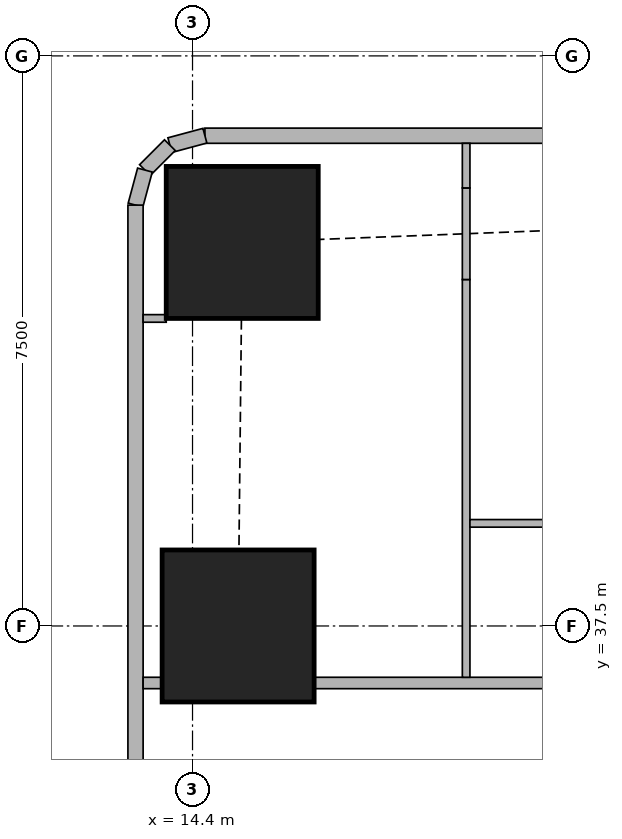
"""IFC4 building model, lengths in metres.
Left out: names, types, materials, properties, quantities, classifications, styles, units other than length and angle.
Written with IfcOpenShell. Run it as: python <this file> out.ifc"""

import sys

from ifc_helpers import new_model, si_unit, direction, frame, frame_2d, origin, origin_2d, place, context, subcontext, project, spatial, rectangle, extrude, element, fill, save


model = new_model("IFC4")
c1 = context("Model", 3, precision=1e-05, world=origin(), true_north=direction((0.0, 1.0)))
c2 = subcontext(c1, "Body", "Model", "MODEL_VIEW")
j1 = project(units=[si_unit("LENGTHUNIT", "METRE"), si_unit("PLANEANGLEUNIT", "RADIAN")], contexts=[c1])
p1 = place(None, origin())
s1 = spatial("IfcSite", under=j1, at=p1, CompositionType="ELEMENT")
p2 = place(p1, origin())
s2 = spatial("IfcBuilding", under=s1, at=p2, CompositionType="ELEMENT")
p3 = place(p2, frame((0.0, 0.0, 285.35)))
s3 = spatial("IfcBuildingStorey", under=s2, at=p3, CompositionType="ELEMENT", Elevation=285.35)
for number, where, z_axis, x_axis in (
    (1, (15.0, 37.5, 0.0), (0.0, 0.0, 1.0), (1.0, 0.0, 0.0)),
    (2, (15.054, 42.546, 0.0), (0.0, 0.0, 1.0), (1.0, 0.0, 0.0)),
):
    element("IfcColumn", number, at=place(p3, frame(where, z_axis=z_axis, x_axis=x_axis)), inside=s3, PredefinedType="COLUMN", context=c2, shape_type="SweptSolid", body=[
        extrude(rectangle(XDim=2.0, YDim=2.0, at=origin_2d()), origin(), (0.0, 0.0, 1.0), 3.75),
    ])
p4 = place(p3, frame((42.103, 43.95, 0.0), z_axis=(0.0, 0.0, 1.0), x_axis=(-1.0, 0.0, 0.0)))
e3 = element("IfcWall", 3, at=p4, inside=s3, PredefinedType="SOLIDWALL", context=c2, shape_type="SweptSolid", body=[
    extrude(rectangle(XDim=27.54, YDim=0.2, at=frame_2d((13.77, 0.0))), origin(), (0.0, 0.0, 1.0), 3.5),
])
p5 = place(p4, frame((10.603, 0.0, 0.9)))
e4 = element("IfcOpeningElement", 4, at=p5, cuts=e3, PredefinedType="OPENING", context=c2, shape_type="SweptSolid", body=[
    extrude(rectangle(XDim=1.8, YDim=1.5, at=frame_2d((0.9, 0.75))), frame((0.0, 0.11, 0.0), z_axis=(0.0, -1.0, 0.0), x_axis=(1.0, 0.0, 0.0)), (0.0, 0.0, 1.0), 0.22),
])
p6 = place(p4, frame((14.203, 0.0, 0.9)))
e5 = element("IfcOpeningElement", 5, at=p6, cuts=e3, PredefinedType="OPENING", context=c2, shape_type="SweptSolid", body=[
    extrude(rectangle(XDim=1.8, YDim=1.5, at=frame_2d((0.9, 0.75))), frame((0.0, 0.11, 0.0), z_axis=(0.0, -1.0, 0.0), x_axis=(1.0, 0.0, 0.0)), (0.0, 0.0, 1.0), 0.22),
])
p7 = place(p4, frame((17.803, 0.0, 0.9)))
e6 = element("IfcOpeningElement", 6, at=p7, cuts=e3, PredefinedType="OPENING", context=c2, shape_type="SweptSolid", body=[
    extrude(rectangle(XDim=1.8, YDim=1.5, at=frame_2d((0.9, 0.75))), frame((0.0, 0.11, 0.0), z_axis=(0.0, -1.0, 0.0), x_axis=(1.0, 0.0, 0.0)), (0.0, 0.0, 1.0), 0.22),
])
p8 = place(p4, frame((21.403, 0.0, 0.9)))
e7 = element("IfcOpeningElement", 7, at=p8, cuts=e3, PredefinedType="OPENING", context=c2, shape_type="SweptSolid", body=[
    extrude(rectangle(XDim=1.8, YDim=1.5, at=frame_2d((0.9, 0.75))), frame((0.0, 0.11, 0.0), z_axis=(0.0, -1.0, 0.0), x_axis=(1.0, 0.0, 0.0)), (0.0, 0.0, 1.0), 0.22),
])
p9 = place(p3, frame((14.563, 43.95, 0.0), z_axis=(0.0, 0.0, 1.0), x_axis=(-0.965655254015, -0.259826731483, 0.0)))
e8 = element("IfcWall", 8, at=p9, inside=s3, PredefinedType="SOLIDWALL", context=c2, shape_type="SweptSolid", body=[
    extrude(rectangle(XDim=0.477, YDim=0.2, at=frame_2d((0.239, 0.0))), origin(), (0.0, 0.0, 1.0), 3.5),
])
p10 = place(p3, frame((14.102, 43.826, 0.0), z_axis=(0.0, 0.0, 1.0), x_axis=(-0.707369890659, -0.706843573776, 0.0)))
e9 = element("IfcWall", 9, at=p10, inside=s3, PredefinedType="SOLIDWALL", context=c2, shape_type="SweptSolid", body=[
    extrude(rectangle(XDim=0.464, YDim=0.2, at=frame_2d((0.232, 0.0))), origin(), (0.0, 0.0, 1.0), 3.5),
])
p11 = place(p3, frame((13.774, 43.498, 0.0), z_axis=(0.0, 0.0, 1.0), x_axis=(-0.259826731483, -0.965655254015, 0.0)))
e10 = element("IfcWall", 10, at=p11, inside=s3, PredefinedType="SOLIDWALL", context=c2, shape_type="SweptSolid", body=[
    extrude(rectangle(XDim=0.477, YDim=0.2, at=frame_2d((0.239, 0.0))), origin(), (0.0, 0.0, 1.0), 3.5),
])
p12 = place(p3, frame((13.65, 43.037, 0.0), z_axis=(0.0, 0.0, 1.0), x_axis=(0.0, -1.0, 0.0)))
e11 = element("IfcWall", 11, at=p12, inside=s3, PredefinedType="SOLIDWALL", context=c2, shape_type="SweptSolid", body=[
    extrude(rectangle(XDim=35.374, YDim=0.2, at=frame_2d((17.687, 0.0))), origin(), (0.0, 0.0, 1.0), 3.5),
])
p13 = place(p3, frame((13.75, 36.75, 0.0), z_axis=(0.0, 0.0, 1.0), x_axis=(1.0, 0.0, 0.0)))
e12 = element("IfcWall", 12, at=p13, inside=s3, PredefinedType="SOLIDWALL", context=c2, shape_type="SweptSolid", body=[
    extrude(rectangle(XDim=0.249, YDim=0.15, at=frame_2d((0.125, 0.0))), origin(), (0.0, 0.0, 1.0), 3.5),
])
p14 = place(p3, frame((16.001, 36.75, 0.0), z_axis=(0.0, 0.0, 1.0), x_axis=(1.0, 0.0, 0.0)))
e13 = element("IfcWall", 13, at=p14, inside=s3, PredefinedType="SOLIDWALL", context=c2, shape_type="SweptSolid", body=[
    extrude(rectangle(XDim=4.898, YDim=0.15, at=frame_2d((2.449, 0.0))), origin(), (0.0, 0.0, 1.0), 3.5),
])
p15 = place(p3, frame((14.054, 41.546, 0.0), z_axis=(0.0, 0.0, 1.0), x_axis=(-1.0, 0.0, 0.0)))
e14 = element("IfcWall", 14, at=p15, inside=s3, PredefinedType="PARTITIONING", context=c2, shape_type="SweptSolid", body=[
    extrude(rectangle(XDim=0.304, YDim=0.1, at=frame_2d((0.152, 0.0))), origin(), (0.0, 0.0, 1.0), 3.5),
])
p16 = place(p3, frame((18.0, 36.825, 0.0), z_axis=(0.0, 0.0, 1.0), x_axis=(0.0, 1.0, 0.0)))
e15 = element("IfcWall", 15, at=p16, inside=s3, PredefinedType="PARTITIONING", context=c2, shape_type="SweptSolid", body=[
    extrude(rectangle(XDim=5.233, YDim=0.1, at=frame_2d((2.617, 0.0))), origin(), (0.0, 0.0, 1.0), 3.5),
])
p17 = place(p16, frame((2.175, 0.0, 0.0)))
e16 = element("IfcOpeningElement", 16, at=p17, cuts=e15, PredefinedType="OPENING", context=c2, shape_type="SweptSolid", body=[
    extrude(rectangle(XDim=0.9, YDim=2.1, at=frame_2d((0.45, 1.05))), frame((0.0, 0.06, 0.0), z_axis=(0.0, -1.0, 0.0), x_axis=(1.0, 0.0, 0.0)), (0.0, 0.0, 1.0), 0.12),
])
p18 = place(p3, frame((18.0, 42.058, 0.0), z_axis=(0.0, 0.0, 1.0), x_axis=(0.0, 1.0, 0.0)))
e17 = element("IfcWall", 17, at=p18, inside=s3, PredefinedType="PARTITIONING", context=c2, shape_type="SweptSolid", body=[
    extrude(rectangle(XDim=1.205, YDim=0.1, at=frame_2d((0.603, 0.0))), origin(), (0.0, 0.0, 1.0), 2.05),
])
p19 = place(p3, frame((18.0, 43.263, 0.0), z_axis=(0.0, 0.0, 1.0), x_axis=(0.0, 1.0, 0.0)))
e18 = element("IfcWall", 18, at=p19, inside=s3, PredefinedType="PARTITIONING", context=c2, shape_type="SweptSolid", body=[
    extrude(rectangle(XDim=0.587, YDim=0.1, at=frame_2d((0.293, 0.0))), origin(), (0.0, 0.0, 1.0), 3.5),
])
p20 = place(p3, frame((18.05, 38.85, 0.0), z_axis=(0.0, 0.0, 1.0), x_axis=(1.0, 0.0, 0.0)))
e19 = element("IfcWall", 19, at=p20, inside=s3, PredefinedType="PARTITIONING", context=c2, shape_type="SweptSolid", body=[
    extrude(rectangle(XDim=7.15, YDim=0.1, at=frame_2d((3.575, 0.0))), origin(), (0.0, 0.0, 1.0), 3.5),
])
p21 = place(p20, frame((1.3, 0.0, 0.0)))
e20 = element("IfcOpeningElement", 20, at=p21, cuts=e19, PredefinedType="OPENING", context=c2, shape_type="SweptSolid", body=[
    extrude(rectangle(XDim=0.9, YDim=2.1, at=frame_2d((0.45, 1.05))), frame((0.0, 0.06, 0.0), z_axis=(0.0, -1.0, 0.0), x_axis=(1.0, 0.0, 0.0)), (0.0, 0.0, 1.0), 0.12),
])
p22 = place(p20, frame((4.9, 0.0, 0.0)))
e21 = element("IfcOpeningElement", 21, at=p22, cuts=e19, PredefinedType="OPENING", context=c2, shape_type="SweptSolid", body=[
    extrude(rectangle(XDim=0.9, YDim=2.1, at=frame_2d((0.45, 1.05))), frame((0.0, 0.06, 0.0), z_axis=(0.0, -1.0, 0.0), x_axis=(1.0, 0.0, 0.0)), (0.0, 0.0, 1.0), 0.12),
])
p23 = place(p8, origin())
e22 = element("IfcWindow", 22, at=p23, inside=s3, PartitioningType="SINGLE_PANEL", PredefinedType="WINDOW", context=c2, shape_type="SweptSolid", body=[
    extrude(rectangle(XDim=1.8, YDim=1.5, at=frame_2d((0.9, 0.75))), frame((0.0, 0.03, 0.0), z_axis=(0.0, -1.0, 0.0), x_axis=(1.0, 0.0, 0.0)), (0.0, 0.0, 1.0), 0.06),
])
fill(e7, e22)
p24 = place(p17, origin())
e23 = element("IfcDoor", 23, at=p24, inside=s3, OperationType="SINGLE_SWING_RIGHT", PredefinedType="DOOR", context=c2, shape_type="SweptSolid", body=[
    extrude(rectangle(XDim=0.9, YDim=2.1, at=frame_2d((0.45, 1.05))), frame((0.0, 0.025, 0.0), z_axis=(0.0, -1.0, 0.0), x_axis=(1.0, 0.0, 0.0)), (0.0, 0.0, 1.0), 0.05),
])
fill(e16, e23)
save(model, sys.argv[1])
